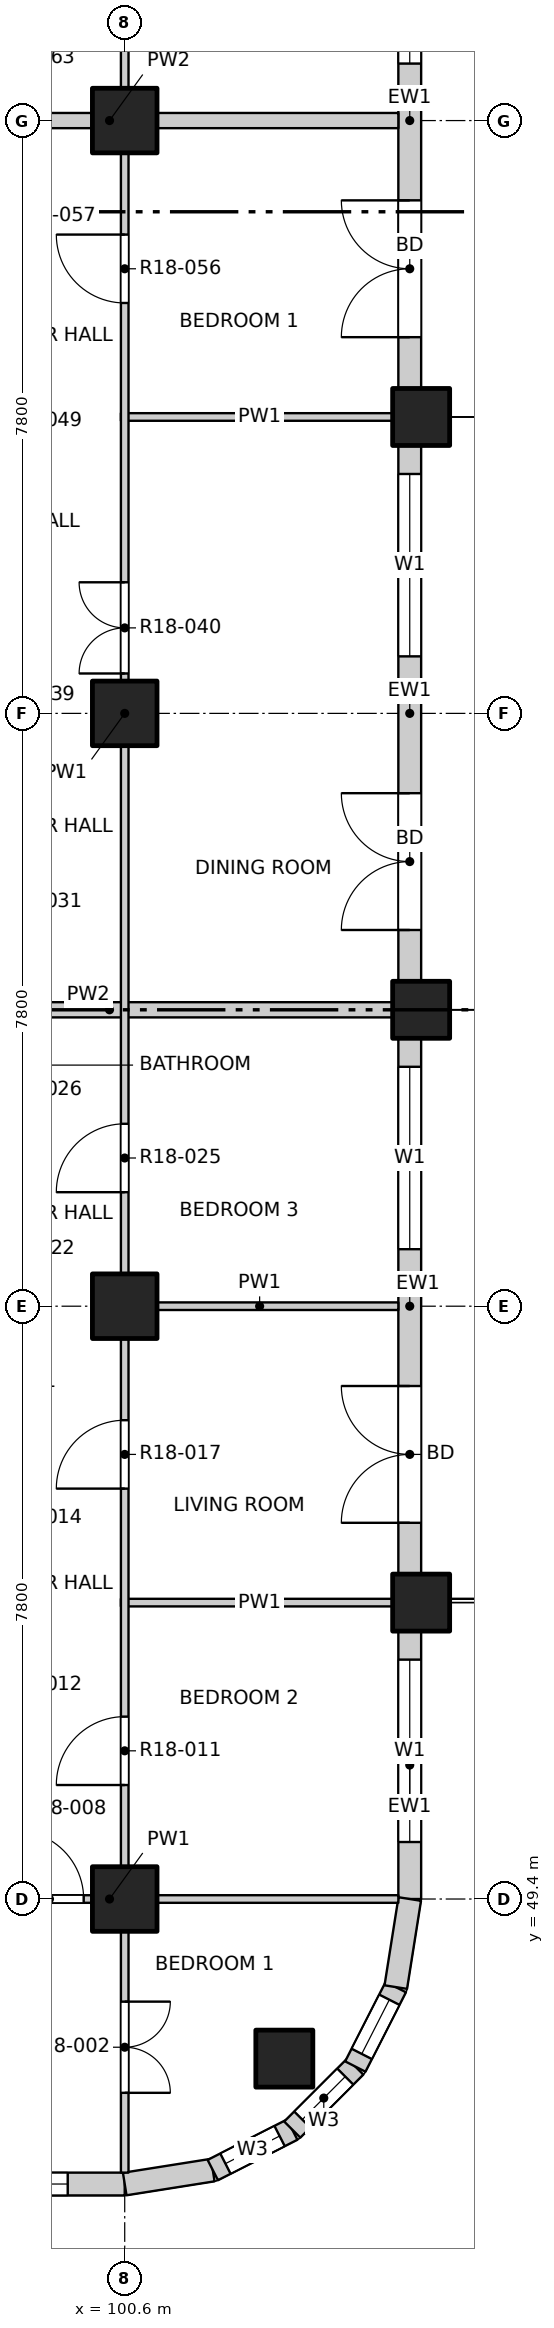
"""IFC4 building model, lengths in metres.
Left out: names, types, materials, properties, quantities, classifications, styles, units other than length and angle.
Written with IfcOpenShell. Run it as: python <this file> out.ifc"""

import sys

from ifc_helpers import new_model, si_unit, direction, frame, frame_2d, origin, origin_2d, place, context, subcontext, project, spatial, rectangle, extrude, element, fill, save


model = new_model("IFC4")
c1 = context("Model", 3, precision=1e-05, world=origin(), true_north=direction((0.0, 1.0)))
c2 = subcontext(c1, "Body", "Model", "MODEL_VIEW")
j1 = project(units=[si_unit("LENGTHUNIT", "METRE"), si_unit("PLANEANGLEUNIT", "RADIAN")], contexts=[c1])
p1 = place(None, origin())
s1 = spatial("IfcSite", under=j1, at=p1, CompositionType="ELEMENT")
p2 = place(p1, origin())
s2 = spatial("IfcBuilding", under=s1, at=p2, CompositionType="ELEMENT")
p3 = place(p2, frame((0.0, 0.0, 186.0)))
s3 = spatial("IfcBuildingStorey", under=s2, at=p3, CompositionType="ELEMENT", Elevation=186.0)
for number, where, z_axis, x_axis in (
    (1, (102.7, 47.3, -0.25), (0.0, 0.0, 1.0), (1.0, 0.0, 0.0)),
    (2, (104.5, 53.3, -0.25), (0.0, 0.0, 1.0), (1.0, 0.0, 0.0)),
    (3, (104.5, 61.1, -0.25), (0.0, 0.0, 1.0), (1.0, 0.0, 0.0)),
    (4, (104.5, 68.9, -0.25), (0.0, 0.0, 1.0), (1.0, 0.0, 0.0)),
):
    element("IfcColumn", number, at=place(p3, frame(where, z_axis=z_axis, x_axis=x_axis)), inside=s3, PredefinedType="COLUMN", context=c2, shape_type="SweptSolid", body=[
        extrude(rectangle(XDim=0.75, YDim=0.75, at=origin_2d()), origin(), (0.0, 0.0, 1.0), 3.4),
    ])
for number, where, z_axis, x_axis in (
    (5, (100.6, 49.4, -0.25), (0.0, 0.0, 1.0), (1.0, 0.0, 0.0)),
    (6, (100.6, 57.2, -0.25), (0.0, 0.0, 1.0), (1.0, 0.0, 0.0)),
    (7, (100.6, 65.0, -0.25), (0.0, 0.0, 1.0), (1.0, 0.0, 0.0)),
    (8, (100.6, 72.8, -0.25), (0.0, 0.0, 1.0), (1.0, 0.0, 0.0)),
):
    element("IfcColumn", number, at=place(p3, frame(where, z_axis=z_axis, x_axis=x_axis)), inside=s3, PredefinedType="COLUMN", context=c2, shape_type="SweptSolid", body=[
        extrude(rectangle(XDim=0.85, YDim=0.85, at=origin_2d()), origin(), (0.0, 0.0, 1.0), 3.4),
    ])
p4 = place(p3, frame((97.075, 45.65, 0.0), z_axis=(0.0, 0.0, 1.0), x_axis=(1.0, 0.0, 0.0)))
e9 = element("IfcWall", 9, at=p4, inside=s3, PredefinedType="SOLIDWALL", context=c2, shape_type="SweptSolid", body=[
    extrude(rectangle(XDim=3.525, YDim=0.3, at=frame_2d((1.763, 0.0))), origin(), (0.0, 0.0, 1.0), 2.7),
])
p5 = place(p4, frame((0.375, 0.0, 0.9)))
e10 = element("IfcOpeningElement", 10, at=p5, cuts=e9, PredefinedType="OPENING", context=c2, shape_type="SweptSolid", body=[
    extrude(rectangle(XDim=2.4, YDim=1.8, at=frame_2d((1.2, 0.9))), frame((0.0, 0.16, 0.0), z_axis=(0.0, -1.0, 0.0), x_axis=(1.0, 0.0, 0.0)), (0.0, 0.0, 1.0), 0.32),
])
p6 = place(p3, frame((104.35, 49.4, 0.0), z_axis=(0.0, 0.0, 1.0), x_axis=(0.0, 1.0, 0.0)))
e11 = element("IfcWall", 11, at=p6, inside=s3, PredefinedType="SOLIDWALL", context=c2, shape_type="SweptSolid", body=[
    extrude(rectangle(XDim=3.525, YDim=0.3, at=frame_2d((1.763, 0.0))), origin(), (0.0, 0.0, 1.0), 2.7),
])
p7 = place(p6, frame((0.75, 0.0, 0.9)))
e12 = element("IfcOpeningElement", 12, at=p7, cuts=e11, PredefinedType="OPENING", context=c2, shape_type="SweptSolid", body=[
    extrude(rectangle(XDim=2.4, YDim=1.8, at=frame_2d((1.2, 0.9))), frame((0.0, 0.16, 0.0), z_axis=(0.0, -1.0, 0.0), x_axis=(1.0, 0.0, 0.0)), (0.0, 0.0, 1.0), 0.32),
])
p8 = place(p3, frame((104.35, 53.675, 0.0), z_axis=(0.0, 0.0, 1.0), x_axis=(0.0, 1.0, 0.0)))
e13 = element("IfcWall", 13, at=p8, inside=s3, PredefinedType="SOLIDWALL", context=c2, shape_type="SweptSolid", body=[
    extrude(rectangle(XDim=7.05, YDim=0.3, at=frame_2d((3.525, 0.0))), origin(), (0.0, 0.0, 1.0), 2.7),
])
p9 = place(p8, frame((0.675, 0.0, 0.0)))
e14 = element("IfcOpeningElement", 14, at=p9, cuts=e13, PredefinedType="OPENING", context=c2, shape_type="SweptSolid", body=[
    extrude(rectangle(XDim=1.8, YDim=2.4, at=frame_2d((0.9, 1.2))), frame((0.0, 0.16, 0.0), z_axis=(0.0, -1.0, 0.0), x_axis=(1.0, 0.0, 0.0)), (0.0, 0.0, 1.0), 0.32),
])
p10 = place(p8, frame((4.275, 0.0, 0.9)))
e15 = element("IfcOpeningElement", 15, at=p10, cuts=e13, PredefinedType="OPENING", context=c2, shape_type="SweptSolid", body=[
    extrude(rectangle(XDim=2.4, YDim=1.8, at=frame_2d((1.2, 0.9))), frame((0.0, 0.16, 0.0), z_axis=(0.0, -1.0, 0.0), x_axis=(1.0, 0.0, 0.0)), (0.0, 0.0, 1.0), 0.32),
])
p11 = place(p3, frame((104.35, 61.475, 0.0), z_axis=(0.0, 0.0, 1.0), x_axis=(0.0, 1.0, 0.0)))
e16 = element("IfcWall", 16, at=p11, inside=s3, PredefinedType="SOLIDWALL", context=c2, shape_type="SweptSolid", body=[
    extrude(rectangle(XDim=7.05, YDim=0.3, at=frame_2d((3.525, 0.0))), origin(), (0.0, 0.0, 1.0), 2.7),
])
p12 = place(p11, frame((0.675, 0.0, 0.0)))
e17 = element("IfcOpeningElement", 17, at=p12, cuts=e16, PredefinedType="OPENING", context=c2, shape_type="SweptSolid", body=[
    extrude(rectangle(XDim=1.8, YDim=2.4, at=frame_2d((0.9, 1.2))), frame((0.0, 0.16, 0.0), z_axis=(0.0, -1.0, 0.0), x_axis=(1.0, 0.0, 0.0)), (0.0, 0.0, 1.0), 0.32),
])
p13 = place(p11, frame((4.275, 0.0, 0.9)))
e18 = element("IfcOpeningElement", 18, at=p13, cuts=e16, PredefinedType="OPENING", context=c2, shape_type="SweptSolid", body=[
    extrude(rectangle(XDim=2.4, YDim=1.8, at=frame_2d((1.2, 0.9))), frame((0.0, 0.16, 0.0), z_axis=(0.0, -1.0, 0.0), x_axis=(1.0, 0.0, 0.0)), (0.0, 0.0, 1.0), 0.32),
])
p14 = place(p3, frame((104.35, 69.275, 0.0), z_axis=(0.0, 0.0, 1.0), x_axis=(0.0, 1.0, 0.0)))
e19 = element("IfcWall", 19, at=p14, inside=s3, PredefinedType="SOLIDWALL", context=c2, shape_type="SweptSolid", body=[
    extrude(rectangle(XDim=7.05, YDim=0.3, at=frame_2d((3.525, 0.0))), origin(), (0.0, 0.0, 1.0), 2.7),
])
p15 = place(p14, frame((0.675, 0.0, 0.0)))
e20 = element("IfcOpeningElement", 20, at=p15, cuts=e19, PredefinedType="OPENING", context=c2, shape_type="SweptSolid", body=[
    extrude(rectangle(XDim=1.8, YDim=2.4, at=frame_2d((0.9, 1.2))), frame((0.0, 0.16, 0.0), z_axis=(0.0, -1.0, 0.0), x_axis=(1.0, 0.0, 0.0)), (0.0, 0.0, 1.0), 0.32),
])
p16 = place(p14, frame((4.275, 0.0, 0.9)))
e21 = element("IfcOpeningElement", 21, at=p16, cuts=e19, PredefinedType="OPENING", context=c2, shape_type="SweptSolid", body=[
    extrude(rectangle(XDim=2.4, YDim=1.8, at=frame_2d((1.2, 0.9))), frame((0.0, 0.16, 0.0), z_axis=(0.0, -1.0, 0.0), x_axis=(1.0, 0.0, 0.0)), (0.0, 0.0, 1.0), 0.32),
])
p17 = place(p3, frame((100.6, 45.65, 0.0), z_axis=(0.0, 0.0, 1.0), x_axis=(0.987678452879, 0.156496880861, 0.0)))
e22 = element("IfcWall", 22, at=p17, inside=s3, PredefinedType="SOLIDWALL", context=c2, shape_type="SweptSolid", body=[
    extrude(rectangle(XDim=1.173, YDim=0.3, at=frame_2d((0.586, 0.0))), origin(), (0.0, 0.0, 1.0), 2.7),
])
p18 = place(p3, frame((101.759, 45.833, 0.0), z_axis=(0.0, 0.0, 1.0), x_axis=(0.890988677504, 0.454025524128, 0.0)))
e23 = element("IfcWall", 23, at=p18, inside=s3, PredefinedType="SOLIDWALL", context=c2, shape_type="SweptSolid", body=[
    extrude(rectangle(XDim=1.173, YDim=0.3, at=frame_2d((0.587, 0.0))), origin(), (0.0, 0.0, 1.0), 2.7),
])
p19 = place(p18, frame((0.187, 0.0, 0.9)))
e24 = element("IfcOpeningElement", 24, at=p19, cuts=e23, PredefinedType="OPENING", context=c2, shape_type="SweptSolid", body=[
    extrude(rectangle(XDim=0.8, YDim=1.2, at=frame_2d((0.4, 0.6))), frame((0.0, 0.16, 0.0), z_axis=(0.0, -1.0, 0.0), x_axis=(1.0, 0.0, 0.0)), (0.0, 0.0, 1.0), 0.32),
])
p20 = place(p3, frame((102.804, 46.366, 0.0), z_axis=(0.0, 0.0, 1.0), x_axis=(0.707106781187, 0.707106781187, 0.0)))
e25 = element("IfcWall", 25, at=p20, inside=s3, PredefinedType="SOLIDWALL", context=c2, shape_type="SweptSolid", body=[
    extrude(rectangle(XDim=1.173, YDim=0.3, at=frame_2d((0.586, 0.0))), origin(), (0.0, 0.0, 1.0), 2.7),
])
p21 = place(p20, frame((0.187, 0.0, 0.9)))
e26 = element("IfcOpeningElement", 26, at=p21, cuts=e25, PredefinedType="OPENING", context=c2, shape_type="SweptSolid", body=[
    extrude(rectangle(XDim=0.8, YDim=1.2, at=frame_2d((0.4, 0.6))), frame((0.0, 0.16, 0.0), z_axis=(0.0, -1.0, 0.0), x_axis=(1.0, 0.0, 0.0)), (0.0, 0.0, 1.0), 0.32),
])
p22 = place(p3, frame((103.634, 47.196, 0.0), z_axis=(0.0, 0.0, 1.0), x_axis=(0.454025524128, 0.890988677504, 0.0)))
e27 = element("IfcWall", 27, at=p22, inside=s3, PredefinedType="SOLIDWALL", context=c2, shape_type="SweptSolid", body=[
    extrude(rectangle(XDim=1.173, YDim=0.3, at=frame_2d((0.587, 0.0))), origin(), (0.0, 0.0, 1.0), 2.7),
])
p23 = place(p22, frame((0.187, 0.0, 0.9)))
e28 = element("IfcOpeningElement", 28, at=p23, cuts=e27, PredefinedType="OPENING", context=c2, shape_type="SweptSolid", body=[
    extrude(rectangle(XDim=0.8, YDim=1.2, at=frame_2d((0.4, 0.6))), frame((0.0, 0.16, 0.0), z_axis=(0.0, -1.0, 0.0), x_axis=(1.0, 0.0, 0.0)), (0.0, 0.0, 1.0), 0.32),
])
p24 = place(p3, frame((104.167, 48.241, 0.0), z_axis=(0.0, 0.0, 1.0), x_axis=(0.156496880861, 0.987678452879, 0.0)))
e29 = element("IfcWall", 29, at=p24, inside=s3, PredefinedType="SOLIDWALL", context=c2, shape_type="SweptSolid", body=[
    extrude(rectangle(XDim=1.173, YDim=0.3, at=frame_2d((0.586, 0.0))), origin(), (0.0, 0.0, 1.0), 2.7),
])
p25 = place(p3, frame((96.6, 49.4, 0.0), z_axis=(0.0, 0.0, 1.0), x_axis=(1.0, 0.0, 0.0)))
e30 = element("IfcWall", 30, at=p25, inside=s3, PredefinedType="PARTITIONING", context=c2, shape_type="SweptSolid", body=[
    extrude(rectangle(XDim=7.6, YDim=0.1, at=frame_2d((3.8, 0.0))), origin(), (0.0, 0.0, 1.0), 3.15),
])
p26 = place(p25, frame((2.56, 0.0, 0.0)))
e31 = element("IfcOpeningElement", 31, at=p26, cuts=e30, PredefinedType="OPENING", context=c2, shape_type="SweptSolid", body=[
    extrude(rectangle(XDim=0.9, YDim=2.1, at=frame_2d((0.45, 1.05))), frame((0.0, 0.06, 0.0), z_axis=(0.0, -1.0, 0.0), x_axis=(1.0, 0.0, 0.0)), (0.0, 0.0, 1.0), 0.12),
])
for number, where, z_axis, x_axis in (
    (32, (100.55, 53.3, 0.0), (0.0, 0.0, 1.0), (1.0, 0.0, 0.0)),
    (33, (100.55, 57.2, 0.0), (0.0, 0.0, 1.0), (1.0, 0.0, 0.0)),
):
    element("IfcWall", number, at=place(p3, frame(where, z_axis=z_axis, x_axis=x_axis)), inside=s3, PredefinedType="PARTITIONING", context=c2, shape_type="SweptSolid", body=[
        extrude(rectangle(XDim=3.65, YDim=0.1, at=frame_2d((1.825, 0.0))), origin(), (0.0, 0.0, 1.0), 3.15),
    ])
p27 = place(p3, frame((96.6, 61.1, 0.0), z_axis=(0.0, 0.0, 1.0), x_axis=(1.0, 0.0, 0.0)))
e34 = element("IfcWall", 34, at=p27, inside=s3, PredefinedType="PARTITIONING", context=c2, shape_type="SweptSolid", body=[
    extrude(rectangle(XDim=7.6, YDim=0.2, at=frame_2d((3.8, 0.0))), origin(), (0.0, 0.0, 1.0), 2.55),
])
p28 = place(p3, frame((100.55, 68.9, 0.0), z_axis=(0.0, 0.0, 1.0), x_axis=(1.0, 0.0, 0.0)))
e35 = element("IfcWall", 35, at=p28, inside=s3, PredefinedType="PARTITIONING", context=c2, shape_type="SweptSolid", body=[
    extrude(rectangle(XDim=3.65, YDim=0.1, at=frame_2d((1.825, 0.0))), origin(), (0.0, 0.0, 1.0), 2.55),
])
p29 = place(p3, frame((96.6, 72.8, 0.0), z_axis=(0.0, 0.0, 1.0), x_axis=(1.0, 0.0, 0.0)))
e36 = element("IfcWall", 36, at=p29, inside=s3, PredefinedType="PARTITIONING", context=c2, shape_type="SweptSolid", body=[
    extrude(rectangle(XDim=7.6, YDim=0.2, at=frame_2d((3.8, 0.0))), origin(), (0.0, 0.0, 1.0), 3.15),
])
p30 = place(p3, frame((100.6, 45.8, 0.0), z_axis=(0.0, 0.0, 1.0), x_axis=(0.0, 1.0, 0.0)))
e37 = element("IfcWall", 37, at=p30, inside=s3, PredefinedType="PARTITIONING", context=c2, shape_type="SweptSolid", body=[
    extrude(rectangle(XDim=38.4, YDim=0.1, at=frame_2d((19.2, 0.0))), origin(), (0.0, 0.0, 1.0), 3.15),
])
p31 = place(p30, frame((1.05, 0.0, 0.0)))
e38 = element("IfcOpeningElement", 38, at=p31, cuts=e37, PredefinedType="OPENING", context=c2, shape_type="SweptSolid", body=[
    extrude(rectangle(XDim=1.2, YDim=2.1, at=frame_2d((0.6, 1.05))), frame((0.0, 0.06, 0.0), z_axis=(0.0, -1.0, 0.0), x_axis=(1.0, 0.0, 0.0)), (0.0, 0.0, 1.0), 0.12),
])
p32 = place(p30, frame((5.1, 0.0, 0.0)))
e39 = element("IfcOpeningElement", 39, at=p32, cuts=e37, PredefinedType="OPENING", context=c2, shape_type="SweptSolid", body=[
    extrude(rectangle(XDim=0.9, YDim=2.1, at=frame_2d((0.45, 1.05))), frame((0.0, 0.06, 0.0), z_axis=(0.0, -1.0, 0.0), x_axis=(1.0, 0.0, 0.0)), (0.0, 0.0, 1.0), 0.12),
])
p33 = place(p30, frame((9.0, 0.0, 0.0)))
e40 = element("IfcOpeningElement", 40, at=p33, cuts=e37, PredefinedType="OPENING", context=c2, shape_type="SweptSolid", body=[
    extrude(rectangle(XDim=0.9, YDim=2.1, at=frame_2d((0.45, 1.05))), frame((0.0, 0.06, 0.0), z_axis=(0.0, -1.0, 0.0), x_axis=(1.0, 0.0, 0.0)), (0.0, 0.0, 1.0), 0.12),
])
p34 = place(p30, frame((12.9, 0.0, 0.0)))
e41 = element("IfcOpeningElement", 41, at=p34, cuts=e37, PredefinedType="OPENING", context=c2, shape_type="SweptSolid", body=[
    extrude(rectangle(XDim=0.9, YDim=2.1, at=frame_2d((0.45, 1.05))), frame((0.0, 0.06, 0.0), z_axis=(0.0, -1.0, 0.0), x_axis=(1.0, 0.0, 0.0)), (0.0, 0.0, 1.0), 0.12),
])
p35 = place(p30, frame((19.725, 0.0, 0.0)))
e42 = element("IfcOpeningElement", 42, at=p35, cuts=e37, PredefinedType="OPENING", context=c2, shape_type="SweptSolid", body=[
    extrude(rectangle(XDim=1.2, YDim=2.1, at=frame_2d((0.6, 1.05))), frame((0.0, 0.06, 0.0), z_axis=(0.0, -1.0, 0.0), x_axis=(1.0, 0.0, 0.0)), (0.0, 0.0, 1.0), 0.12),
])
p36 = place(p30, frame((24.6, 0.0, 0.0)))
e43 = element("IfcOpeningElement", 43, at=p36, cuts=e37, PredefinedType="OPENING", context=c2, shape_type="SweptSolid", body=[
    extrude(rectangle(XDim=0.9, YDim=2.1, at=frame_2d((0.45, 1.05))), frame((0.0, 0.06, 0.0), z_axis=(0.0, -1.0, 0.0), x_axis=(1.0, 0.0, 0.0)), (0.0, 0.0, 1.0), 0.12),
])
p37 = place(p30, frame((28.5, 0.0, 0.0)))
e44 = element("IfcOpeningElement", 44, at=p37, cuts=e37, PredefinedType="OPENING", context=c2, shape_type="SweptSolid", body=[
    extrude(rectangle(XDim=0.9, YDim=2.1, at=frame_2d((0.45, 1.05))), frame((0.0, 0.06, 0.0), z_axis=(0.0, -1.0, 0.0), x_axis=(1.0, 0.0, 0.0)), (0.0, 0.0, 1.0), 0.12),
])
p38 = place(p30, frame((32.4, 0.0, 0.0)))
e45 = element("IfcOpeningElement", 45, at=p38, cuts=e37, PredefinedType="OPENING", context=c2, shape_type="SweptSolid", body=[
    extrude(rectangle(XDim=0.9, YDim=2.1, at=frame_2d((0.45, 1.05))), frame((0.0, 0.06, 0.0), z_axis=(0.0, -1.0, 0.0), x_axis=(1.0, 0.0, 0.0)), (0.0, 0.0, 1.0), 0.12),
])
p39 = place(p30, frame((36.15, 0.0, 0.0)))
e46 = element("IfcOpeningElement", 46, at=p39, cuts=e37, PredefinedType="OPENING", context=c2, shape_type="SweptSolid", body=[
    extrude(rectangle(XDim=1.2, YDim=2.1, at=frame_2d((0.6, 1.05))), frame((0.0, 0.06, 0.0), z_axis=(0.0, -1.0, 0.0), x_axis=(1.0, 0.0, 0.0)), (0.0, 0.0, 1.0), 0.12),
])
p40 = place(p5, origin())
e47 = element("IfcWindow", 47, at=p40, inside=s3, PartitioningType="DOUBLE_PANEL_VERTICAL", PredefinedType="WINDOW", context=c2, shape_type="SweptSolid", body=[
    extrude(rectangle(XDim=2.4, YDim=1.8, at=frame_2d((1.2, 0.9))), frame((0.0, 0.03, 0.0), z_axis=(0.0, -1.0, 0.0), x_axis=(1.0, 0.0, 0.0)), (0.0, 0.0, 1.0), 0.06),
])
fill(e10, e47)
p41 = place(p7, origin())
e48 = element("IfcWindow", 48, at=p41, inside=s3, PartitioningType="DOUBLE_PANEL_VERTICAL", PredefinedType="WINDOW", context=c2, shape_type="SweptSolid", body=[
    extrude(rectangle(XDim=2.4, YDim=1.8, at=frame_2d((1.2, 0.9))), frame((0.0, 0.03, 0.0), z_axis=(0.0, -1.0, 0.0), x_axis=(1.0, 0.0, 0.0)), (0.0, 0.0, 1.0), 0.06),
])
fill(e12, e48)
p42 = place(p9, origin())
e49 = element("IfcDoor", 49, at=p42, inside=s3, OperationType="DOUBLE_DOOR_SINGLE_SWING", PredefinedType="DOOR", context=c2, shape_type="SweptSolid", body=[
    extrude(rectangle(XDim=1.8, YDim=2.4, at=frame_2d((0.9, 1.2))), frame((0.0, 0.025, 0.0), z_axis=(0.0, -1.0, 0.0), x_axis=(1.0, 0.0, 0.0)), (0.0, 0.0, 1.0), 0.05),
])
fill(e14, e49)
p43 = place(p10, origin())
e50 = element("IfcWindow", 50, at=p43, inside=s3, PartitioningType="DOUBLE_PANEL_VERTICAL", PredefinedType="WINDOW", context=c2, shape_type="SweptSolid", body=[
    extrude(rectangle(XDim=2.4, YDim=1.8, at=frame_2d((1.2, 0.9))), frame((0.0, 0.03, 0.0), z_axis=(0.0, -1.0, 0.0), x_axis=(1.0, 0.0, 0.0)), (0.0, 0.0, 1.0), 0.06),
])
fill(e15, e50)
p44 = place(p12, origin())
e51 = element("IfcDoor", 51, at=p44, inside=s3, OperationType="DOUBLE_DOOR_SINGLE_SWING", PredefinedType="DOOR", context=c2, shape_type="SweptSolid", body=[
    extrude(rectangle(XDim=1.8, YDim=2.4, at=frame_2d((0.9, 1.2))), frame((0.0, 0.025, 0.0), z_axis=(0.0, -1.0, 0.0), x_axis=(1.0, 0.0, 0.0)), (0.0, 0.0, 1.0), 0.05),
])
fill(e17, e51)
p45 = place(p13, origin())
e52 = element("IfcWindow", 52, at=p45, inside=s3, PartitioningType="DOUBLE_PANEL_VERTICAL", PredefinedType="WINDOW", context=c2, shape_type="SweptSolid", body=[
    extrude(rectangle(XDim=2.4, YDim=1.8, at=frame_2d((1.2, 0.9))), frame((0.0, 0.03, 0.0), z_axis=(0.0, -1.0, 0.0), x_axis=(1.0, 0.0, 0.0)), (0.0, 0.0, 1.0), 0.06),
])
fill(e18, e52)
p46 = place(p15, origin())
e53 = element("IfcDoor", 53, at=p46, inside=s3, OperationType="DOUBLE_DOOR_SINGLE_SWING", PredefinedType="DOOR", context=c2, shape_type="SweptSolid", body=[
    extrude(rectangle(XDim=1.8, YDim=2.4, at=frame_2d((0.9, 1.2))), frame((0.0, 0.025, 0.0), z_axis=(0.0, -1.0, 0.0), x_axis=(1.0, 0.0, 0.0)), (0.0, 0.0, 1.0), 0.05),
])
fill(e20, e53)
p47 = place(p16, origin())
e54 = element("IfcWindow", 54, at=p47, inside=s3, PartitioningType="DOUBLE_PANEL_VERTICAL", PredefinedType="WINDOW", context=c2, shape_type="SweptSolid", body=[
    extrude(rectangle(XDim=2.4, YDim=1.8, at=frame_2d((1.2, 0.9))), frame((0.0, 0.03, 0.0), z_axis=(0.0, -1.0, 0.0), x_axis=(1.0, 0.0, 0.0)), (0.0, 0.0, 1.0), 0.06),
])
fill(e21, e54)
p48 = place(p19, origin())
e55 = element("IfcWindow", 55, at=p48, inside=s3, PartitioningType="SINGLE_PANEL", PredefinedType="WINDOW", context=c2, shape_type="SweptSolid", body=[
    extrude(rectangle(XDim=0.8, YDim=1.2, at=frame_2d((0.4, 0.6))), frame((0.0, 0.03, 0.0), z_axis=(0.0, -1.0, 0.0), x_axis=(1.0, 0.0, 0.0)), (0.0, 0.0, 1.0), 0.06),
])
fill(e24, e55)
p49 = place(p21, origin())
e56 = element("IfcWindow", 56, at=p49, inside=s3, PartitioningType="SINGLE_PANEL", PredefinedType="WINDOW", context=c2, shape_type="SweptSolid", body=[
    extrude(rectangle(XDim=0.8, YDim=1.2, at=frame_2d((0.4, 0.6))), frame((0.0, 0.03, 0.0), z_axis=(0.0, -1.0, 0.0), x_axis=(1.0, 0.0, 0.0)), (0.0, 0.0, 1.0), 0.06),
])
fill(e26, e56)
p50 = place(p23, origin())
e57 = element("IfcWindow", 57, at=p50, inside=s3, PartitioningType="SINGLE_PANEL", PredefinedType="WINDOW", context=c2, shape_type="SweptSolid", body=[
    extrude(rectangle(XDim=0.8, YDim=1.2, at=frame_2d((0.4, 0.6))), frame((0.0, 0.03, 0.0), z_axis=(0.0, -1.0, 0.0), x_axis=(1.0, 0.0, 0.0)), (0.0, 0.0, 1.0), 0.06),
])
fill(e28, e57)
p51 = place(p31, origin())
e58 = element("IfcDoor", 58, at=p51, inside=s3, OperationType="DOUBLE_DOOR_SINGLE_SWING", PredefinedType="DOOR", context=c2, shape_type="SweptSolid", body=[
    extrude(rectangle(XDim=1.2, YDim=2.1, at=frame_2d((0.6, 1.05))), frame((0.0, 0.025, 0.0), z_axis=(0.0, -1.0, 0.0), x_axis=(1.0, 0.0, 0.0)), (0.0, 0.0, 1.0), 0.05),
])
fill(e38, e58)
p52 = place(p26, origin())
e59 = element("IfcDoor", 59, at=p52, inside=s3, OperationType="SINGLE_SWING_LEFT", PredefinedType="DOOR", context=c2, shape_type="SweptSolid", body=[
    extrude(rectangle(XDim=0.9, YDim=2.1, at=frame_2d((0.45, 1.05))), frame((0.0, 0.025, 0.0), z_axis=(0.0, -1.0, 0.0), x_axis=(1.0, 0.0, 0.0)), (0.0, 0.0, 1.0), 0.05),
])
fill(e31, e59)
p53 = place(p32, origin())
e60 = element("IfcDoor", 60, at=p53, inside=s3, OperationType="SINGLE_SWING_LEFT", PredefinedType="DOOR", context=c2, shape_type="SweptSolid", body=[
    extrude(rectangle(XDim=0.9, YDim=2.1, at=frame_2d((0.45, 1.05))), frame((0.0, 0.025, 0.0), z_axis=(0.0, -1.0, 0.0), x_axis=(1.0, 0.0, 0.0)), (0.0, 0.0, 1.0), 0.05),
])
fill(e39, e60)
p54 = place(p33, origin())
e61 = element("IfcDoor", 61, at=p54, inside=s3, OperationType="SINGLE_SWING_LEFT", PredefinedType="DOOR", context=c2, shape_type="SweptSolid", body=[
    extrude(rectangle(XDim=0.9, YDim=2.1, at=frame_2d((0.45, 1.05))), frame((0.0, 0.025, 0.0), z_axis=(0.0, -1.0, 0.0), x_axis=(1.0, 0.0, 0.0)), (0.0, 0.0, 1.0), 0.05),
])
fill(e40, e61)
p55 = place(p34, origin())
e62 = element("IfcDoor", 62, at=p55, inside=s3, OperationType="SINGLE_SWING_LEFT", PredefinedType="DOOR", context=c2, shape_type="SweptSolid", body=[
    extrude(rectangle(XDim=0.9, YDim=2.1, at=frame_2d((0.45, 1.05))), frame((0.0, 0.025, 0.0), z_axis=(0.0, -1.0, 0.0), x_axis=(1.0, 0.0, 0.0)), (0.0, 0.0, 1.0), 0.05),
])
fill(e41, e62)
p56 = place(p35, origin())
e63 = element("IfcDoor", 63, at=p56, inside=s3, OperationType="DOUBLE_DOOR_SINGLE_SWING", PredefinedType="DOOR", context=c2, shape_type="SweptSolid", body=[
    extrude(rectangle(XDim=1.2, YDim=2.1, at=frame_2d((0.6, 1.05))), frame((0.0, 0.025, 0.0), z_axis=(0.0, -1.0, 0.0), x_axis=(1.0, 0.0, 0.0)), (0.0, 0.0, 1.0), 0.05),
])
fill(e42, e63)
p57 = place(p36, origin())
e64 = element("IfcDoor", 64, at=p57, inside=s3, OperationType="SINGLE_SWING_RIGHT", PredefinedType="DOOR", context=c2, shape_type="SweptSolid", body=[
    extrude(rectangle(XDim=0.9, YDim=2.1, at=frame_2d((0.45, 1.05))), frame((0.0, 0.025, 0.0), z_axis=(0.0, -1.0, 0.0), x_axis=(1.0, 0.0, 0.0)), (0.0, 0.0, 1.0), 0.05),
])
fill(e43, e64)
save(model, sys.argv[1])
